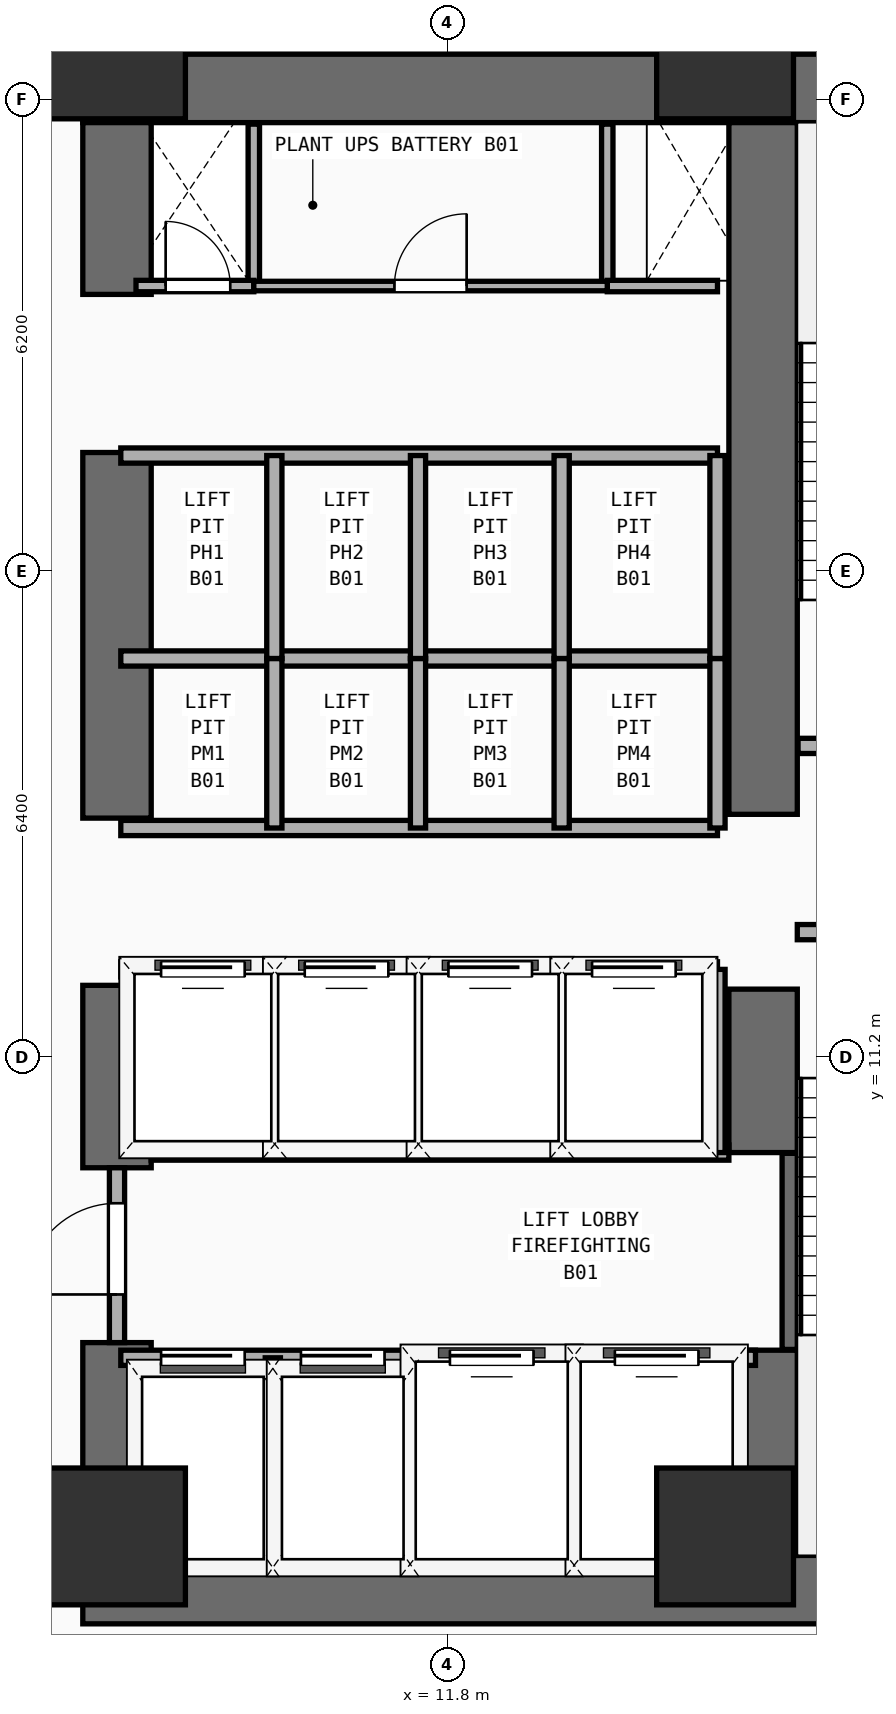
"""IFC4 building model, lengths in metres.
Left out: names, types, materials, properties, quantities, classifications, styles, units other than length and angle.
Written with IfcOpenShell. Run it as: python <this file> out.ifc"""

import sys

from ifc_helpers import new_model, si_unit, direction, frame, frame_2d, origin, origin_2d, place, context, subcontext, project, spatial, rectangle, extrude, element, fill, save


model = new_model("IFC4")
c1 = context("Model", 3, precision=1e-05, world=origin(), true_north=direction((0.0, 1.0)))
c2 = subcontext(c1, "Body", "Model", "MODEL_VIEW")
j1 = project(units=[si_unit("LENGTHUNIT", "METRE"), si_unit("PLANEANGLEUNIT", "RADIAN")], contexts=[c1])
p1 = place(None, origin())
s1 = spatial("IfcSite", under=j1, at=p1, CompositionType="ELEMENT")
p2 = place(p1, origin())
s2 = spatial("IfcBuilding", under=s1, at=p2, CompositionType="ELEMENT")
p3 = place(p2, frame((0.0, 0.0, -4.2)))
s3 = spatial("IfcBuildingStorey", under=s2, at=p3, CompositionType="ELEMENT", Elevation=-4.2)
for number, where, z_axis, x_axis in (
    (1, (7.0, 4.2, 0.0), (0.0, 0.0, 1.0), (1.0, 0.0, 0.0)),
    (2, (7.0, 23.95, 0.0), (0.0, 0.0, 1.0), (1.0, 0.0, 0.0)),
):
    element("IfcWall", number, at=place(p3, frame(where, z_axis=z_axis, x_axis=x_axis)), inside=s3, PredefinedType="SHEAR", context=c2, shape_type="SweptSolid", body=[
        extrude(rectangle(XDim=14.25, YDim=0.9, at=frame_2d((7.125, 0.0))), origin(), (0.0, 0.0, 1.0), 3.82),
    ])
p4 = place(p3, frame((7.45, 4.65, 0.0), z_axis=(0.0, 0.0, 1.0), x_axis=(0.0, 1.0, 0.0)))
e3 = element("IfcWall", 3, at=p4, inside=s3, PredefinedType="SHEAR", context=c2, shape_type="SweptSolid", body=[
    extrude(rectangle(XDim=2.8, YDim=0.9, at=frame_2d((1.4, 0.0))), origin(), (0.0, 0.0, 1.0), 3.82),
])
p5 = place(p3, frame((7.45, 9.75, 0.0), z_axis=(0.0, 0.0, 1.0), x_axis=(0.0, 1.0, 0.0)))
e4 = element("IfcWall", 4, at=p5, inside=s3, PredefinedType="SHEAR", context=c2, shape_type="SweptSolid", body=[
    extrude(rectangle(XDim=2.4, YDim=0.9, at=frame_2d((1.2, 0.0))), origin(), (0.0, 0.0, 1.0), 3.82),
])
p6 = place(p3, frame((7.45, 14.35, 0.0), z_axis=(0.0, 0.0, 1.0), x_axis=(0.0, 1.0, 0.0)))
e5 = element("IfcWall", 5, at=p6, inside=s3, PredefinedType="SHEAR", context=c2, shape_type="SweptSolid", body=[
    extrude(rectangle(XDim=4.81, YDim=0.9, at=frame_2d((2.405, 0.0))), origin(), (0.0, 0.0, 1.0), 3.82),
])
p7 = place(p3, frame((7.45, 21.24, 0.0), z_axis=(0.0, 0.0, 1.0), x_axis=(0.0, 1.0, 0.0)))
e6 = element("IfcWall", 6, at=p7, inside=s3, PredefinedType="SHEAR", context=c2, shape_type="SweptSolid", body=[
    extrude(rectangle(XDim=2.26, YDim=0.9, at=frame_2d((1.13, 0.0))), origin(), (0.0, 0.0, 1.0), 3.82),
])
p8 = place(p3, frame((15.95, 4.65, 0.0), z_axis=(0.0, 0.0, 1.0), x_axis=(0.0, 1.0, 0.0)))
e7 = element("IfcWall", 7, at=p8, inside=s3, PredefinedType="SHEAR", context=c2, shape_type="SweptSolid", body=[
    extrude(rectangle(XDim=2.7, YDim=0.9, at=frame_2d((1.35, 0.0))), origin(), (0.0, 0.0, 1.0), 3.82),
])
p9 = place(p3, frame((15.95, 9.95, 0.0), z_axis=(0.0, 0.0, 1.0), x_axis=(0.0, 1.0, 0.0)))
e8 = element("IfcWall", 8, at=p9, inside=s3, PredefinedType="SHEAR", context=c2, shape_type="SweptSolid", body=[
    extrude(rectangle(XDim=2.15, YDim=0.9, at=frame_2d((1.075, 0.0))), origin(), (0.0, 0.0, 1.0), 3.82),
])
p10 = place(p3, frame((15.95, 14.4, 0.0), z_axis=(0.0, 0.0, 1.0), x_axis=(0.0, 1.0, 0.0)))
e9 = element("IfcWall", 9, at=p10, inside=s3, PredefinedType="SHEAR", context=c2, shape_type="SweptSolid", body=[
    extrude(rectangle(XDim=9.1, YDim=0.9, at=frame_2d((4.55, 0.0))), origin(), (0.0, 0.0, 1.0), 3.82),
])
for number, where, z_axis, x_axis in (
    (10, (7.45, 4.9, 0.0), (0.0, 0.0, 1.0), (1.0, 0.0, 0.0)),
    (11, (15.45, 4.9, 0.0), (0.0, 0.0, 1.0), (1.0, 0.0, 0.0)),
    (12, (7.45, 24.45, 0.0), (0.0, 0.0, 1.0), (1.0, 0.0, 0.0)),
    (13, (15.45, 24.45, 0.0), (0.0, 0.0, 1.0), (1.0, 0.0, 0.0)),
):
    element("IfcColumn", number, at=place(p3, frame(where, z_axis=z_axis, x_axis=x_axis)), inside=s3, PredefinedType="COLUMN", context=c2, shape_type="SweptSolid", body=[
        extrude(rectangle(XDim=1.8, YDim=1.8, at=origin_2d()), origin(), (0.0, 0.0, 1.0), 3.82),
    ])
p11 = place(p3, frame((16.3, 7.36, 0.0), z_axis=(0.0, 0.0, 1.0), x_axis=(0.0, 1.0, 0.0)))
e14 = element("IfcWall", 14, at=p11, inside=s3, PredefinedType="SHEAR", context=c2, shape_type="SweptSolid", body=[
    extrude(rectangle(XDim=2.58, YDim=0.2, at=frame_2d((1.29, 0.0))), origin(), (0.0, 0.0, 1.0), 3.82),
])
p12 = place(p3, frame((16.4, 12.85, 0.0), z_axis=(0.0, 0.0, 1.0), x_axis=(1.0, 0.0, 0.0)))
e15 = element("IfcWall", 15, at=p12, inside=s3, PredefinedType="PARTITIONING", context=c2, shape_type="SweptSolid", body=[
    extrude(rectangle(XDim=3.96, YDim=0.2, at=frame_2d((1.98, 0.0))), origin(), (0.0, 0.0, 1.0), 3.82),
])
p13 = place(p12, frame((1.304, 0.0, 0.0)))
e16 = element("IfcOpeningElement", 16, at=p13, cuts=e15, PredefinedType="OPENING", context=c2, shape_type="SweptSolid", body=[
    extrude(rectangle(XDim=1.1, YDim=2.2, at=frame_2d((0.55, 1.1))), frame((0.0, 0.11, 0.0), z_axis=(0.0, -1.0, 0.0), x_axis=(1.0, 0.0, 0.0)), (0.0, 0.0, 1.0), 0.22),
])
p14 = place(p3, frame((16.41, 15.3, 0.0), z_axis=(0.0, 0.0, 1.0), x_axis=(1.0, 0.0, 0.0)))
e17 = element("IfcWall", 17, at=p14, inside=s3, PredefinedType="PARTITIONING", context=c2, shape_type="SweptSolid", body=[
    extrude(rectangle(XDim=3.95, YDim=0.2, at=frame_2d((1.975, 0.0))), origin(), (0.0, 0.0, 1.0), 3.82),
])
p15 = place(p14, frame((1.294, 0.0, 0.0)))
e18 = element("IfcOpeningElement", 18, at=p15, cuts=e17, PredefinedType="OPENING", context=c2, shape_type="SweptSolid", body=[
    extrude(rectangle(XDim=1.1, YDim=2.2, at=frame_2d((0.55, 1.1))), frame((0.0, 0.11, 0.0), z_axis=(0.0, -1.0, 0.0), x_axis=(1.0, 0.0, 0.0)), (0.0, 0.0, 1.0), 0.22),
])
p16 = place(p3, frame((7.5, 7.25, 0.0), z_axis=(0.0, 0.0, 1.0), x_axis=(1.0, 0.0, 0.0)))
e19 = element("IfcWall", 19, at=p16, inside=s3, PredefinedType="PARTITIONING", context=c2, shape_type="SweptSolid", body=[
    extrude(rectangle(XDim=8.35, YDim=0.2, at=frame_2d((4.175, 0.0))), origin(), (0.0, 0.0, 1.0), 3.82),
])
p17 = place(p16, frame((0.53, 0.0, 0.0)))
e20 = element("IfcOpeningElement", 20, at=p17, cuts=e19, PredefinedType="OPENING", context=c2, shape_type="SweptSolid", body=[
    extrude(rectangle(XDim=1.1, YDim=2.2, at=frame_2d((0.55, 1.1))), frame((0.0, 0.11, 0.0), z_axis=(0.0, -1.0, 0.0), x_axis=(1.0, 0.0, 0.0)), (0.0, 0.0, 1.0), 0.22),
])
p18 = place(p16, frame((2.37, 0.0, 0.0)))
e21 = element("IfcOpeningElement", 21, at=p18, cuts=e19, PredefinedType="OPENING", context=c2, shape_type="SweptSolid", body=[
    extrude(rectangle(XDim=1.1, YDim=2.2, at=frame_2d((0.55, 1.1))), frame((0.0, 0.11, 0.0), z_axis=(0.0, -1.0, 0.0), x_axis=(1.0, 0.0, 0.0)), (0.0, 0.0, 1.0), 0.22),
])
p19 = place(p16, frame((4.33, 0.0, 0.0)))
e22 = element("IfcOpeningElement", 22, at=p19, cuts=e19, PredefinedType="OPENING", context=c2, shape_type="SweptSolid", body=[
    extrude(rectangle(XDim=1.1, YDim=2.2, at=frame_2d((0.55, 1.1))), frame((0.0, 0.11, 0.0), z_axis=(0.0, -1.0, 0.0), x_axis=(1.0, 0.0, 0.0)), (0.0, 0.0, 1.0), 0.22),
])
p20 = place(p16, frame((6.5, 0.0, 0.0)))
e23 = element("IfcOpeningElement", 23, at=p20, cuts=e19, PredefinedType="OPENING", context=c2, shape_type="SweptSolid", body=[
    extrude(rectangle(XDim=1.1, YDim=2.2, at=frame_2d((0.55, 1.1))), frame((0.0, 0.11, 0.0), z_axis=(0.0, -1.0, 0.0), x_axis=(1.0, 0.0, 0.0)), (0.0, 0.0, 1.0), 0.22),
])
p21 = place(p3, frame((7.9, 9.95, 0.0), z_axis=(0.0, 0.0, 1.0), x_axis=(1.0, 0.0, 0.0)))
e24 = element("IfcWall", 24, at=p21, inside=s3, PredefinedType="PARTITIONING", context=c2, shape_type="SweptSolid", body=[
    extrude(rectangle(XDim=7.6, YDim=0.2, at=frame_2d((3.8, 0.0))), origin(), (0.0, 0.0, 1.0), 3.82),
])
for number, where, z_axis, x_axis in (
    (25, (9.5, 4.45, 0.0), (0.0, 0.0, 1.0), (0.0, 1.0, 0.0)),
    (26, (11.36, 4.45, 0.0), (0.0, 0.0, 1.0), (0.0, 1.0, 0.0)),
    (27, (13.46, 4.45, 0.0), (0.0, 0.0, 1.0), (0.0, 1.0, 0.0)),
):
    element("IfcWall", number, at=place(p3, frame(where, z_axis=z_axis, x_axis=x_axis)), inside=s3, PredefinedType="PARTITIONING", context=c2, shape_type="SweptSolid", body=[
        extrude(rectangle(XDim=2.8, YDim=0.2, at=frame_2d((1.4, 0.0))), origin(), (0.0, 0.0, 1.0), 3.82),
    ])
p22 = place(p3, frame((7.45, 7.45, 0.0), z_axis=(0.0, 0.0, 1.0), x_axis=(0.0, 1.0, 0.0)))
e28 = element("IfcWall", 28, at=p22, inside=s3, PredefinedType="PARTITIONING", context=c2, shape_type="SweptSolid", body=[
    extrude(rectangle(XDim=2.3, YDim=0.2, at=frame_2d((1.15, 0.0))), origin(), (0.0, 0.0, 1.0), 2.6),
])
p23 = place(p22, frame((0.633, 0.0, 0.0)))
e29 = element("IfcOpeningElement", 29, at=p23, cuts=e28, PredefinedType="OPENING", context=c2, shape_type="SweptSolid", body=[
    extrude(rectangle(XDim=1.2, YDim=2.25, at=frame_2d((0.6, 1.125))), frame((0.0, 0.11, 0.0), z_axis=(0.0, -1.0, 0.0), x_axis=(1.0, 0.0, 0.0)), (0.0, 0.0, 1.0), 0.22),
])
p24 = place(p3, frame((7.5, 12.36, 0.0), z_axis=(0.0, 0.0, 1.0), x_axis=(1.0, 0.0, 0.0)))
e30 = element("IfcWall", 30, at=p24, inside=s3, PredefinedType="PARTITIONING", context=c2, shape_type="SweptSolid", body=[
    extrude(rectangle(XDim=7.85, YDim=0.2, at=frame_2d((3.925, 0.0))), origin(), (0.0, 0.0, 1.0), 3.82),
])
p25 = place(p24, frame((0.53, 0.0, 0.0)))
e31 = element("IfcOpeningElement", 31, at=p25, cuts=e30, PredefinedType="OPENING", context=c2, shape_type="SweptSolid", body=[
    extrude(rectangle(XDim=1.1, YDim=2.2, at=frame_2d((0.55, 1.1))), frame((0.0, 0.11, 0.0), z_axis=(0.0, -1.0, 0.0), x_axis=(1.0, 0.0, 0.0)), (0.0, 0.0, 1.0), 0.22),
])
p26 = place(p24, frame((2.42, 0.0, 0.0)))
e32 = element("IfcOpeningElement", 32, at=p26, cuts=e30, PredefinedType="OPENING", context=c2, shape_type="SweptSolid", body=[
    extrude(rectangle(XDim=1.1, YDim=2.2, at=frame_2d((0.55, 1.1))), frame((0.0, 0.11, 0.0), z_axis=(0.0, -1.0, 0.0), x_axis=(1.0, 0.0, 0.0)), (0.0, 0.0, 1.0), 0.22),
])
p27 = place(p24, frame((4.31, 0.0, 0.0)))
e33 = element("IfcOpeningElement", 33, at=p27, cuts=e30, PredefinedType="OPENING", context=c2, shape_type="SweptSolid", body=[
    extrude(rectangle(XDim=1.1, YDim=2.2, at=frame_2d((0.55, 1.1))), frame((0.0, 0.11, 0.0), z_axis=(0.0, -1.0, 0.0), x_axis=(1.0, 0.0, 0.0)), (0.0, 0.0, 1.0), 0.22),
])
p28 = place(p24, frame((6.2, 0.0, 0.0)))
e34 = element("IfcOpeningElement", 34, at=p28, cuts=e30, PredefinedType="OPENING", context=c2, shape_type="SweptSolid", body=[
    extrude(rectangle(XDim=1.1, YDim=2.2, at=frame_2d((0.55, 1.1))), frame((0.0, 0.11, 0.0), z_axis=(0.0, -1.0, 0.0), x_axis=(1.0, 0.0, 0.0)), (0.0, 0.0, 1.0), 0.22),
])
for number, where, z_axis, x_axis in (
    (35, (15.35, 9.95, 0.0), (0.0, 0.0, 1.0), (0.0, 1.0, 0.0)),
    (36, (9.52, 9.95, 0.0), (0.0, 0.0, 1.0), (0.0, 1.0, 0.0)),
    (37, (11.41, 9.95, 0.0), (0.0, 0.0, 1.0), (0.0, 1.0, 0.0)),
    (38, (13.3, 9.95, 0.0), (0.0, 0.0, 1.0), (0.0, 1.0, 0.0)),
):
    element("IfcWall", number, at=place(p3, frame(where, z_axis=z_axis, x_axis=x_axis)), inside=s3, PredefinedType="PARTITIONING", context=c2, shape_type="SweptSolid", body=[
        extrude(rectangle(XDim=2.41, YDim=0.2, at=frame_2d((1.205, 0.0))), origin(), (0.0, 0.0, 1.0), 3.82),
    ])
for number, where, z_axis, x_axis in (
    (39, (7.5, 14.22, 0.0), (0.0, 0.0, 1.0), (1.0, 0.0, 0.0)),
    (40, (7.5, 16.45, 0.0), (0.0, 0.0, 1.0), (1.0, 0.0, 0.0)),
):
    element("IfcWall", number, at=place(p3, frame(where, z_axis=z_axis, x_axis=x_axis)), inside=s3, PredefinedType="PARTITIONING", context=c2, shape_type="SweptSolid", body=[
        extrude(rectangle(XDim=7.85, YDim=0.2, at=frame_2d((3.925, 0.0))), origin(), (0.0, 0.0, 1.0), 3.82),
    ])
for number, where, z_axis, x_axis in (
    (41, (15.35, 14.22, 0.0), (0.0, 0.0, 1.0), (0.0, 1.0, 0.0)),
    (42, (9.52, 14.22, 0.0), (0.0, 0.0, 1.0), (0.0, 1.0, 0.0)),
    (43, (11.41, 14.22, 0.0), (0.0, 0.0, 1.0), (0.0, 1.0, 0.0)),
    (44, (13.3, 14.22, 0.0), (0.0, 0.0, 1.0), (0.0, 1.0, 0.0)),
):
    element("IfcWall", number, at=place(p3, frame(where, z_axis=z_axis, x_axis=x_axis)), inside=s3, PredefinedType="PARTITIONING", context=c2, shape_type="SweptSolid", body=[
        extrude(rectangle(XDim=2.23, YDim=0.2, at=frame_2d((1.115, 0.0))), origin(), (0.0, 0.0, 1.0), 3.82),
    ])
p29 = place(p3, frame((7.5, 19.12, 0.0), z_axis=(0.0, 0.0, 1.0), x_axis=(1.0, 0.0, 0.0)))
e45 = element("IfcWall", 45, at=p29, inside=s3, PredefinedType="PARTITIONING", context=c2, shape_type="SweptSolid", body=[
    extrude(rectangle(XDim=7.85, YDim=0.2, at=frame_2d((3.925, 0.0))), origin(), (0.0, 0.0, 1.0), 3.82),
])
for number, where, z_axis, x_axis in (
    (46, (15.35, 16.45, 0.0), (0.0, 0.0, 1.0), (0.0, 1.0, 0.0)),
    (47, (9.52, 16.45, 0.0), (0.0, 0.0, 1.0), (0.0, 1.0, 0.0)),
    (48, (11.41, 16.45, 0.0), (0.0, 0.0, 1.0), (0.0, 1.0, 0.0)),
    (49, (13.3, 16.45, 0.0), (0.0, 0.0, 1.0), (0.0, 1.0, 0.0)),
):
    element("IfcWall", number, at=place(p3, frame(where, z_axis=z_axis, x_axis=x_axis)), inside=s3, PredefinedType="PARTITIONING", context=c2, shape_type="SweptSolid", body=[
        extrude(rectangle(XDim=2.67, YDim=0.2, at=frame_2d((1.335, 0.0))), origin(), (0.0, 0.0, 1.0), 3.82),
    ])
for number, where, z_axis, x_axis in (
    (50, (9.25, 21.35, 0.0), (0.0, 0.0, 1.0), (0.0, 1.0, 0.0)),
    (51, (13.9, 21.35, 0.0), (0.0, 0.0, 1.0), (0.0, 1.0, 0.0)),
):
    element("IfcWall", number, at=place(p3, frame(where, z_axis=z_axis, x_axis=x_axis)), inside=s3, PredefinedType="PARTITIONING", context=c2, shape_type="SweptSolid", body=[
        extrude(rectangle(XDim=2.13, YDim=0.15, at=frame_2d((1.065, 0.0))), origin(), (0.0, 0.0, 1.0), 3.82),
    ])
p30 = place(p3, frame((7.7, 21.35, 0.0), z_axis=(0.0, 0.0, 1.0), x_axis=(1.0, 0.0, 0.0)))
e52 = element("IfcWall", 52, at=p30, inside=s3, PredefinedType="PARTITIONING", context=c2, shape_type="SweptSolid", body=[
    extrude(rectangle(XDim=1.55, YDim=0.15, at=frame_2d((0.775, 0.0))), origin(), (0.0, 0.0, 1.0), 3.82),
])
p31 = place(p30, frame((0.39, 0.0, 0.0)))
e53 = element("IfcOpeningElement", 53, at=p31, cuts=e52, PredefinedType="OPENING", context=c2, shape_type="SweptSolid", body=[
    extrude(rectangle(XDim=0.85, YDim=2.15, at=frame_2d((0.425, 1.075))), frame((0.0, 0.085, 0.0), z_axis=(0.0, -1.0, 0.0), x_axis=(1.0, 0.0, 0.0)), (0.0, 0.0, 1.0), 0.17),
])
p32 = place(p3, frame((13.9, 21.35, 0.0), z_axis=(0.0, 0.0, 1.0), x_axis=(1.0, 0.0, 0.0)))
e54 = element("IfcWall", 54, at=p32, inside=s3, PredefinedType="PARTITIONING", context=c2, shape_type="SweptSolid", body=[
    extrude(rectangle(XDim=1.45, YDim=0.15, at=frame_2d((0.725, 0.0))), origin(), (0.0, 0.0, 1.0), 3.82),
])
p33 = place(p3, frame((9.25, 21.35, 0.0), z_axis=(0.0, 0.0, 1.0), x_axis=(1.0, 0.0, 0.0)))
e55 = element("IfcWall", 55, at=p33, inside=s3, PredefinedType="PARTITIONING", context=c2, shape_type="SweptSolid", body=[
    extrude(rectangle(XDim=4.65, YDim=0.125, at=frame_2d((2.325, 0.0))), origin(), (0.0, 0.0, 1.0), 3.82),
])
p34 = place(p33, frame((1.85, 0.0, 0.0)))
e56 = element("IfcOpeningElement", 56, at=p34, cuts=e55, PredefinedType="OPENING", context=c2, shape_type="SweptSolid", body=[
    extrude(rectangle(XDim=0.95, YDim=2.15, at=frame_2d((0.475, 1.075))), frame((0.0, 0.073, 0.0), z_axis=(0.0, -1.0, 0.0), x_axis=(1.0, 0.0, 0.0)), (0.0, 0.0, 1.0), 0.145),
])
p35 = place(p17, origin())
e57 = element("IfcDoor", 57, at=p35, inside=s3, OperationType="SLIDING_TO_LEFT", PredefinedType="DOOR", context=c2, shape_type="SweptSolid", body=[
    extrude(rectangle(XDim=1.1, YDim=2.2, at=frame_2d((0.55, 1.1))), frame((0.0, 0.025, 0.0), z_axis=(0.0, -1.0, 0.0), x_axis=(1.0, 0.0, 0.0)), (0.0, 0.0, 1.0), 0.05),
])
fill(e20, e57)
p36 = place(p18, origin())
e58 = element("IfcDoor", 58, at=p36, inside=s3, OperationType="SLIDING_TO_LEFT", PredefinedType="DOOR", context=c2, shape_type="SweptSolid", body=[
    extrude(rectangle(XDim=1.1, YDim=2.2, at=frame_2d((0.55, 1.1))), frame((0.0, 0.025, 0.0), z_axis=(0.0, -1.0, 0.0), x_axis=(1.0, 0.0, 0.0)), (0.0, 0.0, 1.0), 0.05),
])
fill(e21, e58)
p37 = place(p19, origin())
e59 = element("IfcDoor", 59, at=p37, inside=s3, OperationType="SLIDING_TO_LEFT", PredefinedType="DOOR", context=c2, shape_type="SweptSolid", body=[
    extrude(rectangle(XDim=1.1, YDim=2.2, at=frame_2d((0.55, 1.1))), frame((0.0, 0.025, 0.0), z_axis=(0.0, -1.0, 0.0), x_axis=(1.0, 0.0, 0.0)), (0.0, 0.0, 1.0), 0.05),
])
fill(e22, e59)
p38 = place(p20, origin())
e60 = element("IfcDoor", 60, at=p38, inside=s3, OperationType="SLIDING_TO_LEFT", PredefinedType="DOOR", context=c2, shape_type="SweptSolid", body=[
    extrude(rectangle(XDim=1.1, YDim=2.2, at=frame_2d((0.55, 1.1))), frame((0.0, 0.025, 0.0), z_axis=(0.0, -1.0, 0.0), x_axis=(1.0, 0.0, 0.0)), (0.0, 0.0, 1.0), 0.05),
])
fill(e23, e60)
p39 = place(p23, frame((1.2, 0.0, 0.0), z_axis=(0.0, 0.0, 1.0), x_axis=(-1.0, 0.0, 0.0)))
e61 = element("IfcDoor", 61, at=p39, inside=s3, OperationType="SINGLE_SWING_RIGHT", PredefinedType="DOOR", context=c2, shape_type="SweptSolid", body=[
    extrude(rectangle(XDim=1.2, YDim=2.25, at=frame_2d((0.6, 1.125))), frame((0.0, 0.025, 0.0), z_axis=(0.0, -1.0, 0.0), x_axis=(1.0, 0.0, 0.0)), (0.0, 0.0, 1.0), 0.05),
])
fill(e29, e61)
p40 = place(p25, origin())
e62 = element("IfcDoor", 62, at=p40, inside=s3, OperationType="SLIDING_TO_LEFT", PredefinedType="DOOR", context=c2, shape_type="SweptSolid", body=[
    extrude(rectangle(XDim=1.1, YDim=2.2, at=frame_2d((0.55, 1.1))), frame((0.0, 0.025, 0.0), z_axis=(0.0, -1.0, 0.0), x_axis=(1.0, 0.0, 0.0)), (0.0, 0.0, 1.0), 0.05),
])
fill(e31, e62)
p41 = place(p26, origin())
e63 = element("IfcDoor", 63, at=p41, inside=s3, OperationType="SLIDING_TO_LEFT", PredefinedType="DOOR", context=c2, shape_type="SweptSolid", body=[
    extrude(rectangle(XDim=1.1, YDim=2.2, at=frame_2d((0.55, 1.1))), frame((0.0, 0.025, 0.0), z_axis=(0.0, -1.0, 0.0), x_axis=(1.0, 0.0, 0.0)), (0.0, 0.0, 1.0), 0.05),
])
fill(e32, e63)
p42 = place(p27, origin())
e64 = element("IfcDoor", 64, at=p42, inside=s3, OperationType="SLIDING_TO_LEFT", PredefinedType="DOOR", context=c2, shape_type="SweptSolid", body=[
    extrude(rectangle(XDim=1.1, YDim=2.2, at=frame_2d((0.55, 1.1))), frame((0.0, 0.025, 0.0), z_axis=(0.0, -1.0, 0.0), x_axis=(1.0, 0.0, 0.0)), (0.0, 0.0, 1.0), 0.05),
])
fill(e33, e64)
p43 = place(p28, origin())
e65 = element("IfcDoor", 65, at=p43, inside=s3, OperationType="SLIDING_TO_LEFT", PredefinedType="DOOR", context=c2, shape_type="SweptSolid", body=[
    extrude(rectangle(XDim=1.1, YDim=2.2, at=frame_2d((0.55, 1.1))), frame((0.0, 0.025, 0.0), z_axis=(0.0, -1.0, 0.0), x_axis=(1.0, 0.0, 0.0)), (0.0, 0.0, 1.0), 0.05),
])
fill(e34, e65)
p44 = place(p31, origin())
e66 = element("IfcDoor", 66, at=p44, inside=s3, OperationType="SINGLE_SWING_LEFT", PredefinedType="DOOR", context=c2, shape_type="SweptSolid", body=[
    extrude(rectangle(XDim=0.85, YDim=2.15, at=frame_2d((0.425, 1.075))), frame((0.0, 0.025, 0.0), z_axis=(0.0, -1.0, 0.0), x_axis=(1.0, 0.0, 0.0)), (0.0, 0.0, 1.0), 0.05),
])
fill(e53, e66)
p45 = place(p34, origin())
e67 = element("IfcDoor", 67, at=p45, inside=s3, OperationType="SINGLE_SWING_RIGHT", PredefinedType="DOOR", context=c2, shape_type="SweptSolid", body=[
    extrude(rectangle(XDim=0.95, YDim=2.15, at=frame_2d((0.475, 1.075))), frame((0.0, 0.025, 0.0), z_axis=(0.0, -1.0, 0.0), x_axis=(1.0, 0.0, 0.0)), (0.0, 0.0, 1.0), 0.05),
])
fill(e56, e67)
save(model, sys.argv[1])
